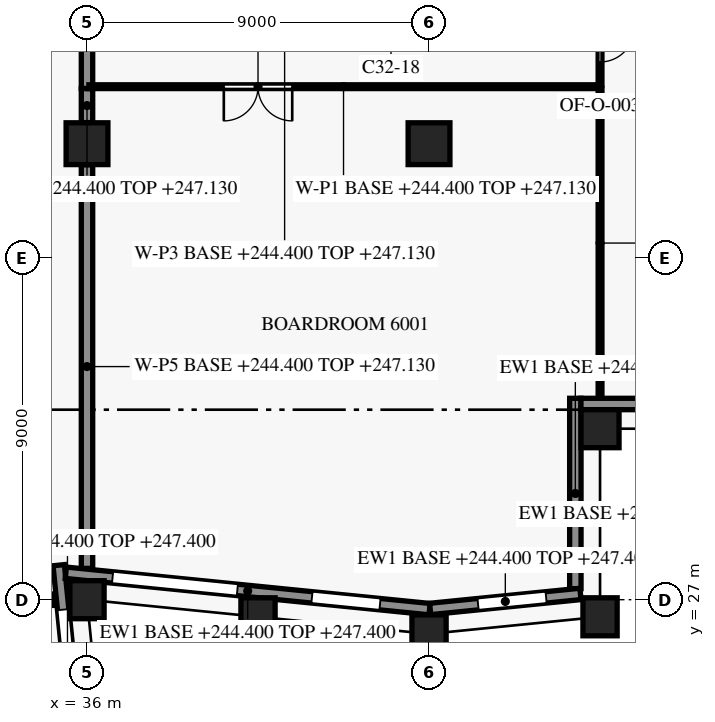
"""IFC4 building model, lengths in metres.
Left out: names, types, materials, properties, quantities, classifications, styles, units other than length and angle.
Written with IfcOpenShell. Run it as: python <this file> out.ifc"""

import sys

from ifc_helpers import new_model, si_unit, direction, frame, frame_2d, origin, origin_2d, place, context, subcontext, project, spatial, rectangle, extrude, element, fill, save


model = new_model("IFC4")
c1 = context("Model", 3, precision=1e-05, world=origin(), true_north=direction((0.0, 1.0)))
c2 = subcontext(c1, "Body", "Model", "MODEL_VIEW")
j1 = project(units=[si_unit("LENGTHUNIT", "METRE"), si_unit("PLANEANGLEUNIT", "RADIAN")], contexts=[c1])
p1 = place(None, origin())
s1 = spatial("IfcSite", under=j1, at=p1, CompositionType="ELEMENT")
p2 = place(p1, origin())
s2 = spatial("IfcBuilding", under=s1, at=p2, CompositionType="ELEMENT")
p3 = place(p2, frame((0.0, 0.0, 244.4)))
s3 = spatial("IfcBuildingStorey", under=s2, at=p3, CompositionType="ELEMENT", Elevation=244.4)
for number, where, z_axis, x_axis in (
    (1, (36.0, 27.0, 0.0), (0.0, 0.0, 1.0), (-0.1, 0.995, 0.0)),
    (2, (40.5, 26.55, 0.0), (0.0, 0.0, 1.0), (0.995, -0.1, 0.0)),
    (3, (45.0, 26.1, 0.0), (0.0, 0.0, 1.0), (1.0, 0.0, 0.0)),
    (4, (49.5, 26.55, 0.0), (0.0, 0.0, 1.0), (0.995, 0.1, 0.0)),
):
    element("IfcColumn", number, at=place(p3, frame(where, z_axis=z_axis, x_axis=x_axis)), inside=s3, PredefinedType="COLUMN", context=c2, shape_type="SweptSolid", body=[
        extrude(rectangle(XDim=0.9, YDim=1.0, at=origin_2d()), origin(), (0.0, 0.0, 1.0), 3.8),
    ])
p4 = place(p3, frame((49.5, 31.5, 0.0), z_axis=(0.0, 0.0, 1.0), x_axis=(1.0, 0.0, 0.0)))
e5 = element("IfcColumn", 5, at=p4, inside=s3, PredefinedType="COLUMN", context=c2, shape_type="SweptSolid", body=[
    extrude(rectangle(XDim=1.0, YDim=1.0, at=origin_2d()), origin(), (0.0, 0.0, 1.0), 3.8),
])
for number, where, z_axis, x_axis in (
    (6, (36.0, 39.0, 0.0), (0.0, 0.0, 1.0), (1.0, 0.0, 0.0)),
    (7, (45.0, 39.0, 0.0), (0.0, 0.0, 1.0), (1.0, 0.0, 0.0)),
):
    element("IfcColumn", number, at=place(p3, frame(where, z_axis=z_axis, x_axis=x_axis)), inside=s3, PredefinedType="COLUMN", context=c2, shape_type="SweptSolid", body=[
        extrude(rectangle(XDim=1.1, YDim=1.1, at=origin_2d()), origin(), (0.0, 0.0, 1.0), 3.8),
    ])
p5 = place(p3, frame((35.256, 27.908, 0.0), z_axis=(0.0, 0.0, 1.0), x_axis=(0.099535070904, -0.995034054523, 0.0)))
e8 = element("IfcWall", 8, at=p5, inside=s3, PredefinedType="SOLIDWALL", context=c2, shape_type="SweptSolid", body=[
    extrude(rectangle(XDim=4.626, YDim=0.3, at=frame_2d((2.313, 0.0))), origin(), (0.0, 0.0, 1.0), 3.0),
])
p6 = place(p5, frame((1.176, 0.0, 0.15)))
e9 = element("IfcOpeningElement", 9, at=p6, cuts=e8, PredefinedType="OPENING", context=c2, shape_type="SweptSolid", body=[
    extrude(rectangle(XDim=3.3, YDim=2.4, at=frame_2d((1.65, 1.2))), frame((0.0, 0.16, 0.0), z_axis=(0.0, -1.0, 0.0), x_axis=(1.0, 0.0, 0.0)), (0.0, 0.0, 1.0), 0.32),
])
p7 = place(p3, frame((45.015, 26.752, 0.0), z_axis=(0.0, 0.0, 1.0), x_axis=(-0.9950379439, 0.099496181828, 0.0)))
e10 = element("IfcWall", 10, at=p7, inside=s3, PredefinedType="SOLIDWALL", context=c2, shape_type="SweptSolid", body=[
    extrude(rectangle(XDim=9.621, YDim=0.3, at=frame_2d((4.811, 0.0))), origin(), (0.0, 0.0, 1.0), 3.0),
])
p8 = place(p7, frame((1.311, 0.0, 0.75)))
e11 = element("IfcOpeningElement", 11, at=p8, cuts=e10, PredefinedType="OPENING", context=c2, shape_type="SweptSolid", body=[
    extrude(rectangle(XDim=1.8, YDim=1.8, at=frame_2d((0.9, 0.9))), frame((0.0, 0.16, 0.0), z_axis=(0.0, -1.0, 0.0), x_axis=(1.0, 0.0, 0.0)), (0.0, 0.0, 1.0), 0.32),
])
p9 = place(p7, frame((5.083, 0.0, 0.15)))
e12 = element("IfcOpeningElement", 12, at=p9, cuts=e10, PredefinedType="OPENING", context=c2, shape_type="SweptSolid", body=[
    extrude(rectangle(XDim=3.3, YDim=2.4, at=frame_2d((1.65, 1.2))), frame((0.0, 0.16, 0.0), z_axis=(0.0, -1.0, 0.0), x_axis=(1.0, 0.0, 0.0)), (0.0, 0.0, 1.0), 0.32),
])
p10 = place(p3, frame((48.985, 27.152, 0.0), z_axis=(0.0, 0.0, 1.0), x_axis=(-0.995037798293, -0.099497638, 0.0)))
e13 = element("IfcWall", 13, at=p10, inside=s3, PredefinedType="SOLIDWALL", context=c2, shape_type="SweptSolid", body=[
    extrude(rectangle(XDim=3.975, YDim=0.3, at=frame_2d((1.988, 0.0))), origin(), (0.0, 0.0, 1.0), 3.0),
])
p11 = place(p10, frame((0.909, 0.0, 0.75)))
e14 = element("IfcOpeningElement", 14, at=p11, cuts=e13, PredefinedType="OPENING", context=c2, shape_type="SweptSolid", body=[
    extrude(rectangle(XDim=1.8, YDim=1.8, at=frame_2d((0.9, 0.9))), frame((0.0, 0.16, 0.0), z_axis=(0.0, -1.0, 0.0), x_axis=(1.0, 0.0, 0.0)), (0.0, 0.0, 1.0), 0.32),
])
p12 = place(p3, frame((48.85, 32.3, 0.0), z_axis=(0.0, 0.0, 1.0), x_axis=(0.0, -1.0, 0.0)))
e15 = element("IfcWall", 15, at=p12, inside=s3, PredefinedType="SOLIDWALL", context=c2, shape_type="SweptSolid", body=[
    extrude(rectangle(XDim=5.01, YDim=0.3, at=frame_2d((2.505, 0.0))), origin(), (0.0, 0.0, 1.0), 3.0),
])
p13 = place(p3, frame((53.5, 32.15, 0.0), z_axis=(0.0, 0.0, 1.0), x_axis=(-1.0, 0.0, 0.0)))
e16 = element("IfcWall", 16, at=p13, inside=s3, PredefinedType="SOLIDWALL", context=c2, shape_type="SweptSolid", body=[
    extrude(rectangle(XDim=4.502, YDim=0.3, at=frame_2d((2.251, 0.0))), origin(), (0.0, 0.0, 1.0), 3.0),
])
p14 = place(p3, frame((24.555, 27.0, 0.0), z_axis=(0.0, 0.0, 1.0), x_axis=(1.0, 0.0, 0.0)))
e17 = element("IfcWall", 17, at=p14, inside=s3, PredefinedType="PARTITIONING", context=c2, shape_type="SweptSolid", body=[
    extrude(rectangle(XDim=10.591, YDim=0.3, at=frame_2d((5.295, 0.0))), origin(), (0.0, 0.0, 1.0), 2.73),
])
p15 = place(p3, frame((36.0, 27.824, 0.0), z_axis=(0.0, 0.0, 1.0), x_axis=(0.0, 1.0, 0.0)))
e18 = element("IfcWall", 18, at=p15, inside=s3, PredefinedType="PARTITIONING", context=c2, shape_type="SweptSolid", body=[
    extrude(rectangle(XDim=10.621, YDim=0.3, at=frame_2d((5.311, 0.0))), origin(), (0.0, 0.0, 1.0), 2.73),
])
p16 = place(p3, frame((49.5, 32.32, 0.0), z_axis=(0.0, 0.0, 1.0), x_axis=(0.0, 1.0, 0.0)))
e19 = element("IfcWall", 19, at=p16, inside=s3, PredefinedType="PARTITIONING", context=c2, shape_type="SweptSolid", body=[
    extrude(rectangle(XDim=8.13, YDim=0.1, at=frame_2d((4.065, 0.0))), origin(), (0.0, 0.0, 1.0), 2.73),
])
p17 = place(p3, frame((36.0, 39.555, 0.0), z_axis=(0.0, 0.0, 1.0), x_axis=(0.0, 1.0, 0.0)))
e20 = element("IfcWall", 20, at=p17, inside=s3, PredefinedType="PARTITIONING", context=c2, shape_type="SweptSolid", body=[
    extrude(rectangle(XDim=0.895, YDim=0.3, at=frame_2d((0.448, 0.0))), origin(), (0.0, 0.0, 1.0), 2.73),
])
p18 = place(p3, frame((49.45, 40.5, 0.0), z_axis=(0.0, 0.0, 1.0), x_axis=(-1.0, 0.0, 0.0)))
e21 = element("IfcWall", 21, at=p18, inside=s3, PredefinedType="PARTITIONING", context=c2, shape_type="SweptSolid", body=[
    extrude(rectangle(XDim=13.4, YDim=0.1, at=frame_2d((6.7, 0.0))), origin(), (0.0, 0.0, 1.0), 2.73),
])
p19 = place(p18, frame((8.05, 0.0, 0.0)))
e22 = element("IfcOpeningElement", 22, at=p19, cuts=e21, PredefinedType="OPENING", context=c2, shape_type="SweptSolid", body=[
    extrude(rectangle(XDim=1.8, YDim=2.1, at=frame_2d((0.9, 1.05))), frame((0.0, 0.06, 0.0), z_axis=(0.0, -1.0, 0.0), x_axis=(1.0, 0.0, 0.0)), (0.0, 0.0, 1.0), 0.12),
])
p20 = place(p3, frame((36.0, 40.455, 0.0), z_axis=(0.0, 0.0, 1.0), x_axis=(0.0, 1.0, 0.0)))
e23 = element("IfcWall", 23, at=p20, inside=s3, PredefinedType="PARTITIONING", context=c2, shape_type="SweptSolid", body=[
    extrude(rectangle(XDim=4.485, YDim=0.3, at=frame_2d((2.242, 0.0))), origin(), (0.0, 0.0, 1.0), 2.73),
])
p21 = place(p3, frame((49.5, 42.9, 0.0), z_axis=(0.0, 0.0, 1.0), x_axis=(0.0, -1.0, 0.0)))
e24 = element("IfcWall", 24, at=p21, inside=s3, PredefinedType="PARTITIONING", context=c2, shape_type="SweptSolid", body=[
    extrude(rectangle(XDim=2.35, YDim=0.1, at=frame_2d((1.175, 0.0))), origin(), (0.0, 0.0, 1.0), 2.73),
])
p22 = place(p21, frame((0.85, 0.0, 0.0)))
e25 = element("IfcOpeningElement", 25, at=p22, cuts=e24, PredefinedType="OPENING", context=c2, shape_type="SweptSolid", body=[
    extrude(rectangle(XDim=0.9, YDim=2.1, at=frame_2d((0.45, 1.05))), frame((0.0, 0.06, 0.0), z_axis=(0.0, -1.0, 0.0), x_axis=(1.0, 0.0, 0.0)), (0.0, 0.0, 1.0), 0.12),
])
p23 = place(p6, origin())
e26 = element("IfcWindow", 26, at=p23, inside=s3, PartitioningType="SINGLE_PANEL", PredefinedType="WINDOW", context=c2, shape_type="SweptSolid", body=[
    extrude(rectangle(XDim=3.3, YDim=2.4, at=frame_2d((1.65, 1.2))), frame((0.0, 0.03, 0.0), z_axis=(0.0, -1.0, 0.0), x_axis=(1.0, 0.0, 0.0)), (0.0, 0.0, 1.0), 0.06),
])
fill(e9, e26)
p24 = place(p8, origin())
e27 = element("IfcWindow", 27, at=p24, inside=s3, PartitioningType="SINGLE_PANEL", PredefinedType="WINDOW", context=c2, shape_type="SweptSolid", body=[
    extrude(rectangle(XDim=1.8, YDim=1.8, at=frame_2d((0.9, 0.9))), frame((0.0, 0.03, 0.0), z_axis=(0.0, -1.0, 0.0), x_axis=(1.0, 0.0, 0.0)), (0.0, 0.0, 1.0), 0.06),
])
fill(e11, e27)
p25 = place(p9, origin())
e28 = element("IfcWindow", 28, at=p25, inside=s3, PartitioningType="SINGLE_PANEL", PredefinedType="WINDOW", context=c2, shape_type="SweptSolid", body=[
    extrude(rectangle(XDim=3.3, YDim=2.4, at=frame_2d((1.65, 1.2))), frame((0.0, 0.03, 0.0), z_axis=(0.0, -1.0, 0.0), x_axis=(1.0, 0.0, 0.0)), (0.0, 0.0, 1.0), 0.06),
])
fill(e12, e28)
p26 = place(p11, origin())
e29 = element("IfcWindow", 29, at=p26, inside=s3, PartitioningType="SINGLE_PANEL", PredefinedType="WINDOW", context=c2, shape_type="SweptSolid", body=[
    extrude(rectangle(XDim=1.8, YDim=1.8, at=frame_2d((0.9, 0.9))), frame((0.0, 0.03, 0.0), z_axis=(0.0, -1.0, 0.0), x_axis=(1.0, 0.0, 0.0)), (0.0, 0.0, 1.0), 0.06),
])
fill(e14, e29)
p27 = place(p22, origin())
e30 = element("IfcDoor", 30, at=p27, inside=s3, OperationType="SINGLE_SWING_LEFT", PredefinedType="DOOR", context=c2, shape_type="SweptSolid", body=[
    extrude(rectangle(XDim=0.9, YDim=2.1, at=frame_2d((0.45, 1.05))), frame((0.0, 0.025, 0.0), z_axis=(0.0, -1.0, 0.0), x_axis=(1.0, 0.0, 0.0)), (0.0, 0.0, 1.0), 0.05),
])
fill(e25, e30)
p28 = place(p19, origin())
e31 = element("IfcDoor", 31, at=p28, inside=s3, OperationType="DOUBLE_DOOR_SINGLE_SWING", PredefinedType="DOOR", context=c2, shape_type="SweptSolid", body=[
    extrude(rectangle(XDim=1.8, YDim=2.1, at=frame_2d((0.9, 1.05))), frame((0.0, 0.025, 0.0), z_axis=(0.0, -1.0, 0.0), x_axis=(1.0, 0.0, 0.0)), (0.0, 0.0, 1.0), 0.05),
])
fill(e22, e31)
save(model, sys.argv[1])
